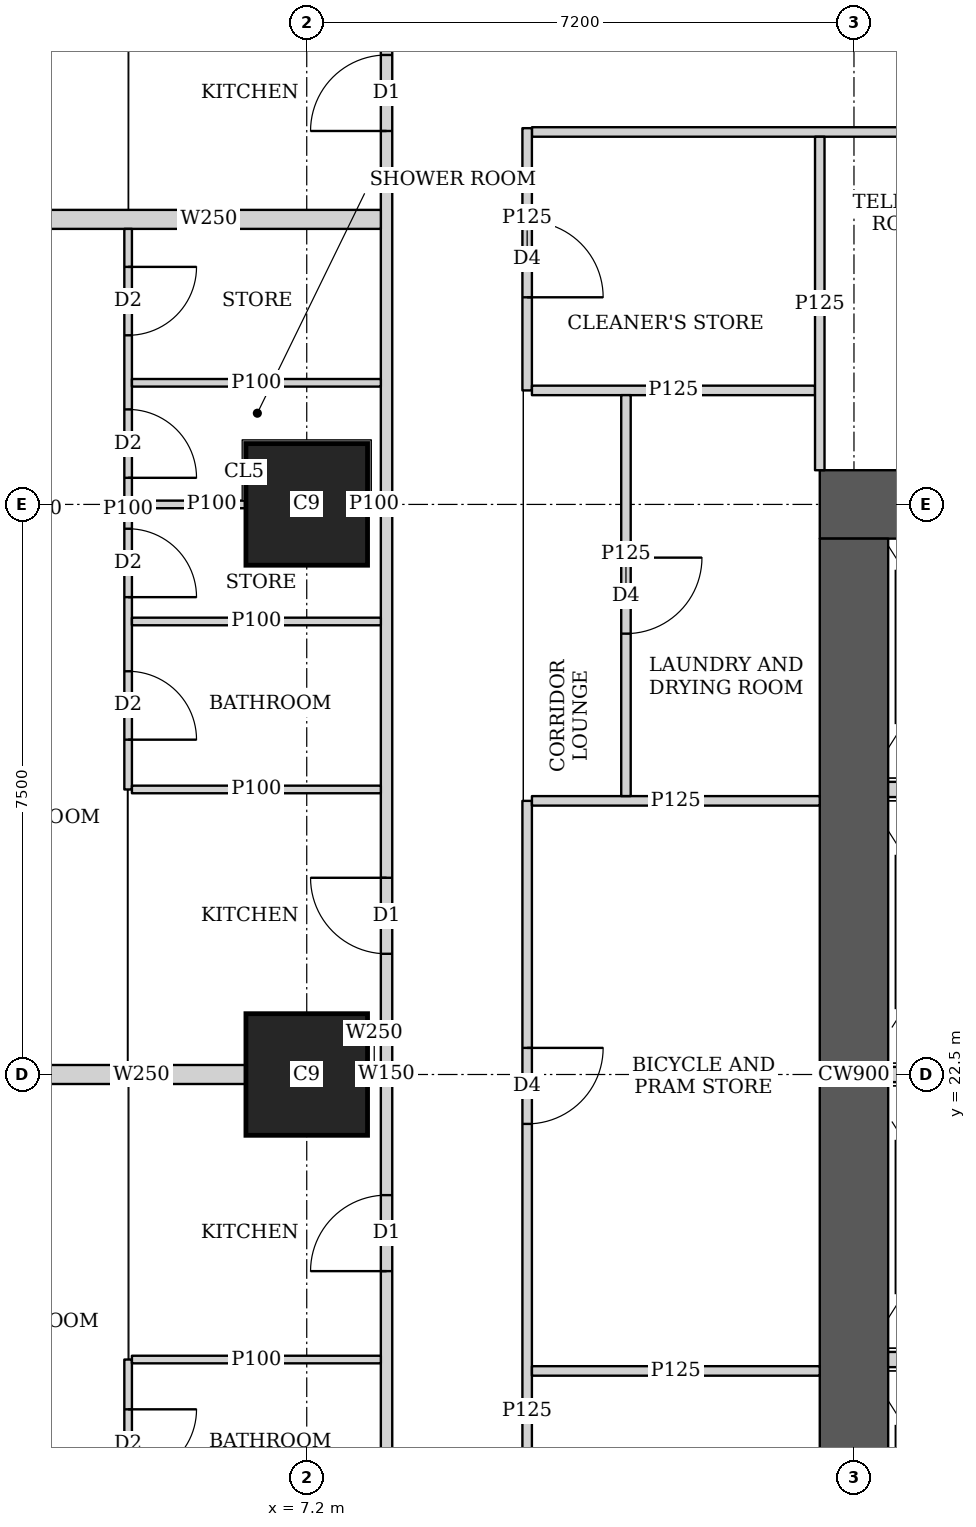
"""IFC4 building model, lengths in metres.
Left out: names, types, materials, properties, quantities, classifications, styles, units other than length and angle.
Written with IfcOpenShell. Run it as: python <this file> out.ifc"""

import sys

from ifc_helpers import new_model, si_unit, direction, frame, frame_2d, origin, origin_2d, place, context, subcontext, project, spatial, rectangle, extrude, element, fill, save


model = new_model("IFC4")
c1 = context("Model", 3, precision=1e-05, world=origin(), true_north=direction((0.0, 1.0)))
c2 = subcontext(c1, "Body", "Model", "MODEL_VIEW")
j1 = project(units=[si_unit("LENGTHUNIT", "METRE"), si_unit("PLANEANGLEUNIT", "RADIAN")], contexts=[c1])
p1 = place(None, origin())
s1 = spatial("IfcSite", under=j1, at=p1, CompositionType="ELEMENT")
p2 = place(p1, origin())
s2 = spatial("IfcBuilding", under=s1, at=p2, CompositionType="ELEMENT")
p3 = place(p2, frame((0.0, 0.0, 77.9)))
s3 = spatial("IfcBuildingStorey", under=s2, at=p3, CompositionType="ELEMENT", Elevation=77.9)
for number, where, z_axis, x_axis in (
    (1, (7.2, 22.5, 0.0), (0.0, 0.0, 1.0), (1.0, 0.0, 0.0)),
    (2, (7.2, 30.0, 0.0), (0.0, 0.0, 1.0), (1.0, 0.0, 0.0)),
):
    element("IfcColumn", number, at=place(p3, frame(where, z_axis=z_axis, x_axis=x_axis)), inside=s3, PredefinedType="COLUMN", context=c2, shape_type="SweptSolid", body=[
        extrude(rectangle(XDim=1.6, YDim=1.6, at=origin_2d()), origin(), (0.0, 0.0, 1.0), 3.75),
    ])
p4 = place(p3, frame((13.95, 30.0, 0.0), z_axis=(0.0, 0.0, 1.0), x_axis=(1.0, 0.0, 0.0)))
e3 = element("IfcWall", 3, at=p4, inside=s3, PredefinedType="SHEAR", context=c2, shape_type="SweptSolid", body=[
    extrude(rectangle(XDim=15.3, YDim=0.9, at=frame_2d((7.65, 0.0))), origin(), (0.0, 0.0, 1.0), 3.75),
])
p5 = place(p4, frame((4.45, 0.0, 0.0)))
e4 = element("IfcOpeningElement", 4, at=p5, cuts=e3, PredefinedType="OPENING", context=c2, shape_type="SweptSolid", body=[
    extrude(rectangle(XDim=1.8, YDim=2.1, at=frame_2d((0.9, 1.05))), frame((0.0, 0.46, 0.0), z_axis=(0.0, -1.0, 0.0), x_axis=(1.0, 0.0, 0.0)), (0.0, 0.0, 1.0), 0.92),
])
p6 = place(p4, frame((10.7, 0.0, 0.0)))
e5 = element("IfcOpeningElement", 5, at=p6, cuts=e3, PredefinedType="OPENING", context=c2, shape_type="SweptSolid", body=[
    extrude(rectangle(XDim=1.1, YDim=2.1, at=frame_2d((0.55, 1.05))), frame((0.0, 0.46, 0.0), z_axis=(0.0, -1.0, 0.0), x_axis=(1.0, 0.0, 0.0)), (0.0, 0.0, 1.0), 0.92),
])
p7 = place(p3, frame((14.4, 15.45, 0.0), z_axis=(0.0, 0.0, 1.0), x_axis=(0.0, 1.0, 0.0)))
e6 = element("IfcWall", 6, at=p7, inside=s3, PredefinedType="SHEAR", context=c2, shape_type="SweptSolid", body=[
    extrude(rectangle(XDim=14.1, YDim=0.9, at=frame_2d((7.05, 0.0))), origin(), (0.0, 0.0, 1.0), 3.75),
])
p8 = place(p3, frame((8.25, 2.126, 0.0), z_axis=(0.0, 0.0, 1.0), x_axis=(0.0, 1.0, 0.0)))
e7 = element("IfcWall", 7, at=p8, inside=s3, PredefinedType="SOLIDWALL", context=c2, shape_type="SweptSolid", body=[
    extrude(rectangle(XDim=40.773, YDim=0.15, at=frame_2d((20.386, 0.0))), origin(), (0.0, 0.0, 1.0), 3.5),
])
p9 = place(p8, frame((17.787, 0.0, 0.0)))
e8 = element("IfcOpeningElement", 8, at=p9, cuts=e7, PredefinedType="OPENING", context=c2, shape_type="SweptSolid", body=[
    extrude(rectangle(XDim=1.0, YDim=2.1, at=frame_2d((0.5, 1.05))), frame((0.0, 0.085, 0.0), z_axis=(0.0, -1.0, 0.0), x_axis=(1.0, 0.0, 0.0)), (0.0, 0.0, 1.0), 0.17),
])
p10 = place(p8, frame((21.962, 0.0, 0.0)))
e9 = element("IfcOpeningElement", 9, at=p10, cuts=e7, PredefinedType="OPENING", context=c2, shape_type="SweptSolid", body=[
    extrude(rectangle(XDim=1.0, YDim=2.1, at=frame_2d((0.5, 1.05))), frame((0.0, 0.085, 0.0), z_axis=(0.0, -1.0, 0.0), x_axis=(1.0, 0.0, 0.0)), (0.0, 0.0, 1.0), 0.17),
])
p11 = place(p8, frame((32.787, 0.0, 0.0)))
e10 = element("IfcOpeningElement", 10, at=p11, cuts=e7, PredefinedType="OPENING", context=c2, shape_type="SweptSolid", body=[
    extrude(rectangle(XDim=1.0, YDim=2.1, at=frame_2d((0.5, 1.05))), frame((0.0, 0.085, 0.0), z_axis=(0.0, -1.0, 0.0), x_axis=(1.0, 0.0, 0.0)), (0.0, 0.0, 1.0), 0.17),
])
p12 = place(p3, frame((4.85, 2.812, 0.0), z_axis=(0.0, 0.0, 1.0), x_axis=(0.0, 1.0, 0.0)))
e11 = element("IfcWall", 11, at=p12, inside=s3, PredefinedType="PARTITIONING", context=c2, shape_type="SweptSolid", body=[
    extrude(rectangle(XDim=15.938, YDim=0.1, at=frame_2d((7.969, 0.0))), origin(), (0.0, 0.0, 1.0), 3.5),
])
p13 = place(p12, frame((14.383, 0.0, 0.0)))
e12 = element("IfcOpeningElement", 12, at=p13, cuts=e11, PredefinedType="OPENING", context=c2, shape_type="SweptSolid", body=[
    extrude(rectangle(XDim=0.9, YDim=2.1, at=frame_2d((0.45, 1.05))), frame((0.0, 0.06, 0.0), z_axis=(0.0, -1.0, 0.0), x_axis=(1.0, 0.0, 0.0)), (0.0, 0.0, 1.0), 0.12),
])
p14 = place(p12, frame((10.938, 0.0, 0.0)))
e13 = element("IfcOpeningElement", 13, at=p14, cuts=e11, PredefinedType="OPENING", context=c2, shape_type="SweptSolid", body=[
    extrude(rectangle(XDim=0.9, YDim=2.1, at=frame_2d((0.45, 1.05))), frame((0.0, 0.06, 0.0), z_axis=(0.0, -1.0, 0.0), x_axis=(1.0, 0.0, 0.0)), (0.0, 0.0, 1.0), 0.12),
])
p15 = place(p12, frame((7.078, 0.0, 0.0)))
e14 = element("IfcOpeningElement", 14, at=p15, cuts=e11, PredefinedType="OPENING", context=c2, shape_type="SweptSolid", body=[
    extrude(rectangle(XDim=0.9, YDim=2.1, at=frame_2d((0.45, 1.05))), frame((0.0, 0.06, 0.0), z_axis=(0.0, -1.0, 0.0), x_axis=(1.0, 0.0, 0.0)), (0.0, 0.0, 1.0), 0.12),
])
p16 = place(p12, frame((2.363, 0.0, 0.0)))
e15 = element("IfcOpeningElement", 15, at=p16, cuts=e11, PredefinedType="OPENING", context=c2, shape_type="SweptSolid", body=[
    extrude(rectangle(XDim=0.9, YDim=2.1, at=frame_2d((0.45, 1.05))), frame((0.0, 0.06, 0.0), z_axis=(0.0, -1.0, 0.0), x_axis=(1.0, 0.0, 0.0)), (0.0, 0.0, 1.0), 0.12),
])
p17 = place(p12, frame((12.508, 0.0, 0.0)))
e16 = element("IfcOpeningElement", 16, at=p17, cuts=e11, PredefinedType="OPENING", context=c2, shape_type="SweptSolid", body=[
    extrude(rectangle(XDim=0.9, YDim=2.1, at=frame_2d((0.45, 1.05))), frame((0.0, 0.06, 0.0), z_axis=(0.0, -1.0, 0.0), x_axis=(1.0, 0.0, 0.0)), (0.0, 0.0, 1.0), 0.12),
])
p18 = place(p12, frame((9.063, 0.0, 0.0)))
e17 = element("IfcOpeningElement", 17, at=p18, cuts=e11, PredefinedType="OPENING", context=c2, shape_type="SweptSolid", body=[
    extrude(rectangle(XDim=0.9, YDim=2.1, at=frame_2d((0.45, 1.05))), frame((0.0, 0.06, 0.0), z_axis=(0.0, -1.0, 0.0), x_axis=(1.0, 0.0, 0.0)), (0.0, 0.0, 1.0), 0.12),
])
p19 = place(p12, frame((5.203, 0.0, 0.0)))
e18 = element("IfcOpeningElement", 18, at=p19, cuts=e11, PredefinedType="OPENING", context=c2, shape_type="SweptSolid", body=[
    extrude(rectangle(XDim=0.9, YDim=2.1, at=frame_2d((0.45, 1.05))), frame((0.0, 0.06, 0.0), z_axis=(0.0, -1.0, 0.0), x_axis=(1.0, 0.0, 0.0)), (0.0, 0.0, 1.0), 0.12),
])
p20 = place(p3, frame((4.9, 18.75, 0.0), z_axis=(0.0, 0.0, 1.0), x_axis=(1.0, 0.0, 0.0)))
e19 = element("IfcWall", 19, at=p20, inside=s3, PredefinedType="PARTITIONING", context=c2, shape_type="SweptSolid", body=[
    extrude(rectangle(XDim=3.275, YDim=0.1, at=frame_2d((1.638, 0.0))), origin(), (0.0, 0.0, 1.0), 3.5),
])
p21 = place(p3, frame((4.85, 26.25, 0.0), z_axis=(0.0, 0.0, 1.0), x_axis=(0.0, 1.0, 0.0)))
e20 = element("IfcWall", 20, at=p21, inside=s3, PredefinedType="PARTITIONING", context=c2, shape_type="SweptSolid", body=[
    extrude(rectangle(XDim=7.375, YDim=0.1, at=frame_2d((3.688, 0.0))), origin(), (0.0, 0.0, 1.0), 3.5),
])
p22 = place(p21, frame((0.655, 0.0, 0.0)))
e21 = element("IfcOpeningElement", 21, at=p22, cuts=e20, PredefinedType="OPENING", context=c2, shape_type="SweptSolid", body=[
    extrude(rectangle(XDim=0.9, YDim=2.1, at=frame_2d((0.45, 1.05))), frame((0.0, 0.06, 0.0), z_axis=(0.0, -1.0, 0.0), x_axis=(1.0, 0.0, 0.0)), (0.0, 0.0, 1.0), 0.12),
])
p23 = place(p21, frame((4.1, 0.0, 0.0)))
e22 = element("IfcOpeningElement", 22, at=p23, cuts=e20, PredefinedType="OPENING", context=c2, shape_type="SweptSolid", body=[
    extrude(rectangle(XDim=0.9, YDim=2.1, at=frame_2d((0.45, 1.05))), frame((0.0, 0.06, 0.0), z_axis=(0.0, -1.0, 0.0), x_axis=(1.0, 0.0, 0.0)), (0.0, 0.0, 1.0), 0.12),
])
p24 = place(p21, frame((2.53, 0.0, 0.0)))
e23 = element("IfcOpeningElement", 23, at=p24, cuts=e20, PredefinedType="OPENING", context=c2, shape_type="SweptSolid", body=[
    extrude(rectangle(XDim=0.9, YDim=2.1, at=frame_2d((0.45, 1.05))), frame((0.0, 0.06, 0.0), z_axis=(0.0, -1.0, 0.0), x_axis=(1.0, 0.0, 0.0)), (0.0, 0.0, 1.0), 0.12),
])
p25 = place(p21, frame((5.975, 0.0, 0.0)))
e24 = element("IfcOpeningElement", 24, at=p25, cuts=e20, PredefinedType="OPENING", context=c2, shape_type="SweptSolid", body=[
    extrude(rectangle(XDim=0.9, YDim=2.1, at=frame_2d((0.45, 1.05))), frame((0.0, 0.06, 0.0), z_axis=(0.0, -1.0, 0.0), x_axis=(1.0, 0.0, 0.0)), (0.0, 0.0, 1.0), 0.12),
])
p26 = place(p3, frame((4.9, 26.25, 0.0), z_axis=(0.0, 0.0, 1.0), x_axis=(1.0, 0.0, 0.0)))
e25 = element("IfcWall", 25, at=p26, inside=s3, PredefinedType="PARTITIONING", context=c2, shape_type="SweptSolid", body=[
    extrude(rectangle(XDim=3.275, YDim=0.1, at=frame_2d((1.638, 0.0))), origin(), (0.0, 0.0, 1.0), 3.5),
])
p27 = place(p3, frame((4.9, 30.0, 0.0), z_axis=(0.0, 0.0, 1.0), x_axis=(1.0, 0.0, 0.0)))
e26 = element("IfcWall", 26, at=p27, inside=s3, PredefinedType="PARTITIONING", context=c2, shape_type="SweptSolid", body=[
    extrude(rectangle(XDim=1.499, YDim=0.1, at=frame_2d((0.75, 0.0))), origin(), (0.0, 0.0, 1.0), 3.5),
])
p28 = place(p3, frame((8.001, 30.0, 0.0), z_axis=(0.0, 0.0, 1.0), x_axis=(1.0, 0.0, 0.0)))
e27 = element("IfcWall", 27, at=p28, inside=s3, PredefinedType="PARTITIONING", context=c2, shape_type="SweptSolid", body=[
    extrude(rectangle(XDim=0.174, YDim=0.1, at=frame_2d((0.087, 0.0))), origin(), (0.0, 0.0, 1.0), 3.5),
])
for number, where, z_axis, x_axis in (
    (28, (4.9, 28.46, 0.0), (0.0, 0.0, 1.0), (1.0, 0.0, 0.0)),
    (29, (4.9, 31.6, 0.0), (0.0, 0.0, 1.0), (1.0, 0.0, 0.0)),
):
    element("IfcWall", number, at=place(p3, frame(where, z_axis=z_axis, x_axis=x_axis)), inside=s3, PredefinedType="PARTITIONING", context=c2, shape_type="SweptSolid", body=[
        extrude(rectangle(XDim=3.275, YDim=0.1, at=frame_2d((1.638, 0.0))), origin(), (0.0, 0.0, 1.0), 3.5),
    ])
p29 = place(p3, frame((3.65, 22.5, 0.0), z_axis=(0.0, 0.0, 1.0), x_axis=(1.0, 0.0, 0.0)))
e30 = element("IfcWall", 30, at=p29, inside=s3, PredefinedType="SOLIDWALL", context=c2, shape_type="SweptSolid", body=[
    extrude(rectangle(XDim=2.749, YDim=0.25, at=frame_2d((1.375, 0.0))), origin(), (0.0, 0.0, 1.0), 3.5),
])
p30 = place(p3, frame((8.001, 22.5, 0.0), z_axis=(0.0, 0.0, 1.0), x_axis=(1.0, 0.0, 0.0)))
e31 = element("IfcWall", 31, at=p30, inside=s3, PredefinedType="SOLIDWALL", context=c2, shape_type="SweptSolid", body=[
    extrude(rectangle(XDim=0.174, YDim=0.25, at=frame_2d((0.087, 0.0))), origin(), (0.0, 0.0, 1.0), 3.5),
])
p31 = place(p3, frame((3.65, 33.75, 0.0), z_axis=(0.0, 0.0, 1.0), x_axis=(1.0, 0.0, 0.0)))
e32 = element("IfcWall", 32, at=p31, inside=s3, PredefinedType="SOLIDWALL", context=c2, shape_type="SweptSolid", body=[
    extrude(rectangle(XDim=4.525, YDim=0.25, at=frame_2d((2.263, 0.0))), origin(), (0.0, 0.0, 1.0), 3.5),
])
p32 = place(p3, frame((10.1, 10.05, 0.0), z_axis=(0.0, 0.0, 1.0), x_axis=(0.0, 1.0, 0.0)))
e33 = element("IfcWall", 33, at=p32, inside=s3, PredefinedType="PARTITIONING", context=c2, shape_type="SweptSolid", body=[
    extrude(rectangle(XDim=16.05, YDim=0.125, at=frame_2d((8.025, 0.0))), origin(), (0.0, 0.0, 1.0), 3.5),
])
p33 = place(p32, frame((1.675, 0.0, 0.0)))
e34 = element("IfcOpeningElement", 34, at=p33, cuts=e33, PredefinedType="OPENING", context=c2, shape_type="SweptSolid", body=[
    extrude(rectangle(XDim=1.0, YDim=2.1, at=frame_2d((0.5, 1.05))), frame((0.0, 0.073, 0.0), z_axis=(0.0, -1.0, 0.0), x_axis=(1.0, 0.0, 0.0)), (0.0, 0.0, 1.0), 0.145),
])
p34 = place(p32, frame((5.95, 0.0, 0.0)))
e35 = element("IfcOpeningElement", 35, at=p34, cuts=e33, PredefinedType="OPENING", context=c2, shape_type="SweptSolid", body=[
    extrude(rectangle(XDim=1.0, YDim=2.1, at=frame_2d((0.5, 1.05))), frame((0.0, 0.073, 0.0), z_axis=(0.0, -1.0, 0.0), x_axis=(1.0, 0.0, 0.0)), (0.0, 0.0, 1.0), 0.145),
])
p35 = place(p32, frame((11.8, 0.0, 0.0)))
e36 = element("IfcOpeningElement", 36, at=p35, cuts=e33, PredefinedType="OPENING", context=c2, shape_type="SweptSolid", body=[
    extrude(rectangle(XDim=1.0, YDim=2.1, at=frame_2d((0.5, 1.05))), frame((0.0, 0.073, 0.0), z_axis=(0.0, -1.0, 0.0), x_axis=(1.0, 0.0, 0.0)), (0.0, 0.0, 1.0), 0.145),
])
p36 = place(p3, frame((10.1, 31.5, 0.0), z_axis=(0.0, 0.0, 1.0), x_axis=(0.0, 1.0, 0.0)))
e37 = element("IfcWall", 37, at=p36, inside=s3, PredefinedType="PARTITIONING", context=c2, shape_type="SweptSolid", body=[
    extrude(rectangle(XDim=3.45, YDim=0.125, at=frame_2d((1.725, 0.0))), origin(), (0.0, 0.0, 1.0), 3.5),
])
p37 = place(p36, frame((1.225, 0.0, 0.0)))
e38 = element("IfcOpeningElement", 38, at=p37, cuts=e37, PredefinedType="OPENING", context=c2, shape_type="SweptSolid", body=[
    extrude(rectangle(XDim=1.0, YDim=2.1, at=frame_2d((0.5, 1.05))), frame((0.0, 0.073, 0.0), z_axis=(0.0, -1.0, 0.0), x_axis=(1.0, 0.0, 0.0)), (0.0, 0.0, 1.0), 0.145),
])
p38 = place(p3, frame((11.4, 26.163, 0.0), z_axis=(0.0, 0.0, 1.0), x_axis=(0.0, 1.0, 0.0)))
e39 = element("IfcWall", 39, at=p38, inside=s3, PredefinedType="PARTITIONING", context=c2, shape_type="SweptSolid", body=[
    extrude(rectangle(XDim=5.275, YDim=0.125, at=frame_2d((2.637, 0.0))), origin(), (0.0, 0.0, 1.0), 3.5),
])
p39 = place(p38, frame((2.137, 0.0, 0.0)))
e40 = element("IfcOpeningElement", 40, at=p39, cuts=e39, PredefinedType="OPENING", context=c2, shape_type="SweptSolid", body=[
    extrude(rectangle(XDim=1.0, YDim=2.1, at=frame_2d((0.5, 1.05))), frame((0.0, 0.073, 0.0), z_axis=(0.0, -1.0, 0.0), x_axis=(1.0, 0.0, 0.0)), (0.0, 0.0, 1.0), 0.145),
])
for number, where, z_axis, x_axis in (
    (41, (10.163, 18.6, 0.0), (0.0, 0.0, 1.0), (1.0, 0.0, 0.0)),
    (42, (10.163, 26.1, 0.0), (0.0, 0.0, 1.0), (1.0, 0.0, 0.0)),
):
    element("IfcWall", number, at=place(p3, frame(where, z_axis=z_axis, x_axis=x_axis)), inside=s3, PredefinedType="PARTITIONING", context=c2, shape_type="SweptSolid", body=[
        extrude(rectangle(XDim=3.787, YDim=0.125, at=frame_2d((1.894, 0.0))), origin(), (0.0, 0.0, 1.0), 3.5),
    ])
p40 = place(p3, frame((10.163, 31.5, 0.0), z_axis=(0.0, 0.0, 1.0), x_axis=(1.0, 0.0, 0.0)))
e43 = element("IfcWall", 43, at=p40, inside=s3, PredefinedType="PARTITIONING", context=c2, shape_type="SweptSolid", body=[
    extrude(rectangle(XDim=3.725, YDim=0.125, at=frame_2d((1.862, 0.0))), origin(), (0.0, 0.0, 1.0), 3.5),
])
p41 = place(p3, frame((13.95, 30.45, 0.0), z_axis=(0.0, 0.0, 1.0), x_axis=(0.0, 1.0, 0.0)))
e44 = element("IfcWall", 44, at=p41, inside=s3, PredefinedType="PARTITIONING", context=c2, shape_type="SweptSolid", body=[
    extrude(rectangle(XDim=4.387, YDim=0.125, at=frame_2d((2.193, 0.0))), origin(), (0.0, 0.0, 1.0), 3.5),
])
p42 = place(p3, frame((10.163, 34.9, 0.0), z_axis=(0.0, 0.0, 1.0), x_axis=(1.0, 0.0, 0.0)))
e45 = element("IfcWall", 45, at=p42, inside=s3, PredefinedType="PARTITIONING", context=c2, shape_type="SweptSolid", body=[
    extrude(rectangle(XDim=11.287, YDim=0.125, at=frame_2d((5.644, 0.0))), origin(), (0.0, 0.0, 1.0), 3.5),
])
p43 = place(p42, frame((7.737, 0.0, 0.0)))
e46 = element("IfcOpeningElement", 46, at=p43, cuts=e45, PredefinedType="OPENING", context=c2, shape_type="SweptSolid", body=[
    extrude(rectangle(XDim=1.8, YDim=2.1, at=frame_2d((0.9, 1.05))), frame((0.0, 0.073, 0.0), z_axis=(0.0, -1.0, 0.0), x_axis=(1.0, 0.0, 0.0)), (0.0, 0.0, 1.0), 0.145),
])
for number, where, z_axis, x_axis in (
    (47, (14.85, 18.75, 0.0), (0.0, 0.0, 1.0), (1.0, 0.0, 0.0)),
    (48, (14.85, 22.5, 0.0), (0.0, 0.0, 1.0), (1.0, 0.0, 0.0)),
    (49, (14.85, 26.25, 0.0), (0.0, 0.0, 1.0), (1.0, 0.0, 0.0)),
):
    element("IfcWall", number, at=place(p3, frame(where, z_axis=z_axis, x_axis=x_axis)), inside=s3, PredefinedType="SOLIDWALL", context=c2, shape_type="SweptSolid", body=[
        extrude(rectangle(XDim=1.95, YDim=0.2, at=frame_2d((0.975, 0.0))), origin(), (0.0, 0.0, 1.0), 3.5),
    ])
p44 = place(p13, origin())
e50 = element("IfcDoor", 50, at=p44, inside=s3, OperationType="SINGLE_SWING_LEFT", PredefinedType="DOOR", context=c2, shape_type="SweptSolid", body=[
    extrude(rectangle(XDim=0.9, YDim=2.1, at=frame_2d((0.45, 1.05))), frame((0.0, 0.025, 0.0), z_axis=(0.0, -1.0, 0.0), x_axis=(1.0, 0.0, 0.0)), (0.0, 0.0, 1.0), 0.05),
])
fill(e12, e50)
p45 = place(p9, origin())
e51 = element("IfcDoor", 51, at=p45, inside=s3, OperationType="SINGLE_SWING_LEFT", PredefinedType="DOOR", context=c2, shape_type="SweptSolid", body=[
    extrude(rectangle(XDim=1.0, YDim=2.1, at=frame_2d((0.5, 1.05))), frame((0.0, 0.025, 0.0), z_axis=(0.0, -1.0, 0.0), x_axis=(1.0, 0.0, 0.0)), (0.0, 0.0, 1.0), 0.05),
])
fill(e8, e51)
p46 = place(p22, origin())
e52 = element("IfcDoor", 52, at=p46, inside=s3, OperationType="SINGLE_SWING_RIGHT", PredefinedType="DOOR", context=c2, shape_type="SweptSolid", body=[
    extrude(rectangle(XDim=0.9, YDim=2.1, at=frame_2d((0.45, 1.05))), frame((0.0, 0.025, 0.0), z_axis=(0.0, -1.0, 0.0), x_axis=(1.0, 0.0, 0.0)), (0.0, 0.0, 1.0), 0.05),
])
fill(e21, e52)
p47 = place(p23, origin())
e53 = element("IfcDoor", 53, at=p47, inside=s3, OperationType="SINGLE_SWING_RIGHT", PredefinedType="DOOR", context=c2, shape_type="SweptSolid", body=[
    extrude(rectangle(XDim=0.9, YDim=2.1, at=frame_2d((0.45, 1.05))), frame((0.0, 0.025, 0.0), z_axis=(0.0, -1.0, 0.0), x_axis=(1.0, 0.0, 0.0)), (0.0, 0.0, 1.0), 0.05),
])
fill(e22, e53)
p48 = place(p24, origin())
e54 = element("IfcDoor", 54, at=p48, inside=s3, OperationType="SINGLE_SWING_RIGHT", PredefinedType="DOOR", context=c2, shape_type="SweptSolid", body=[
    extrude(rectangle(XDim=0.9, YDim=2.1, at=frame_2d((0.45, 1.05))), frame((0.0, 0.025, 0.0), z_axis=(0.0, -1.0, 0.0), x_axis=(1.0, 0.0, 0.0)), (0.0, 0.0, 1.0), 0.05),
])
fill(e23, e54)
p49 = place(p25, origin())
e55 = element("IfcDoor", 55, at=p49, inside=s3, OperationType="SINGLE_SWING_LEFT", PredefinedType="DOOR", context=c2, shape_type="SweptSolid", body=[
    extrude(rectangle(XDim=0.9, YDim=2.1, at=frame_2d((0.45, 1.05))), frame((0.0, 0.025, 0.0), z_axis=(0.0, -1.0, 0.0), x_axis=(1.0, 0.0, 0.0)), (0.0, 0.0, 1.0), 0.05),
])
fill(e24, e55)
p50 = place(p10, origin())
e56 = element("IfcDoor", 56, at=p50, inside=s3, OperationType="SINGLE_SWING_RIGHT", PredefinedType="DOOR", context=c2, shape_type="SweptSolid", body=[
    extrude(rectangle(XDim=1.0, YDim=2.1, at=frame_2d((0.5, 1.05))), frame((0.0, 0.025, 0.0), z_axis=(0.0, -1.0, 0.0), x_axis=(1.0, 0.0, 0.0)), (0.0, 0.0, 1.0), 0.05),
])
fill(e9, e56)
p51 = place(p11, origin())
e57 = element("IfcDoor", 57, at=p51, inside=s3, OperationType="SINGLE_SWING_LEFT", PredefinedType="DOOR", context=c2, shape_type="SweptSolid", body=[
    extrude(rectangle(XDim=1.0, YDim=2.1, at=frame_2d((0.5, 1.05))), frame((0.0, 0.025, 0.0), z_axis=(0.0, -1.0, 0.0), x_axis=(1.0, 0.0, 0.0)), (0.0, 0.0, 1.0), 0.05),
])
fill(e10, e57)
p52 = place(p35, origin())
e58 = element("IfcDoor", 58, at=p52, inside=s3, OperationType="SINGLE_SWING_LEFT", PredefinedType="DOOR", context=c2, shape_type="SweptSolid", body=[
    extrude(rectangle(XDim=1.0, YDim=2.1, at=frame_2d((0.5, 1.05))), frame((0.0, 0.025, 0.0), z_axis=(0.0, -1.0, 0.0), x_axis=(1.0, 0.0, 0.0)), (0.0, 0.0, 1.0), 0.05),
])
fill(e36, e58)
p53 = place(p39, origin())
e59 = element("IfcDoor", 59, at=p53, inside=s3, OperationType="SINGLE_SWING_LEFT", PredefinedType="DOOR", context=c2, shape_type="SweptSolid", body=[
    extrude(rectangle(XDim=1.0, YDim=2.1, at=frame_2d((0.5, 1.05))), frame((0.0, 0.025, 0.0), z_axis=(0.0, -1.0, 0.0), x_axis=(1.0, 0.0, 0.0)), (0.0, 0.0, 1.0), 0.05),
])
fill(e40, e59)
p54 = place(p37, origin())
e60 = element("IfcDoor", 60, at=p54, inside=s3, OperationType="SINGLE_SWING_RIGHT", PredefinedType="DOOR", context=c2, shape_type="SweptSolid", body=[
    extrude(rectangle(XDim=1.0, YDim=2.1, at=frame_2d((0.5, 1.05))), frame((0.0, 0.025, 0.0), z_axis=(0.0, -1.0, 0.0), x_axis=(1.0, 0.0, 0.0)), (0.0, 0.0, 1.0), 0.05),
])
fill(e38, e60)
save(model, sys.argv[1])
